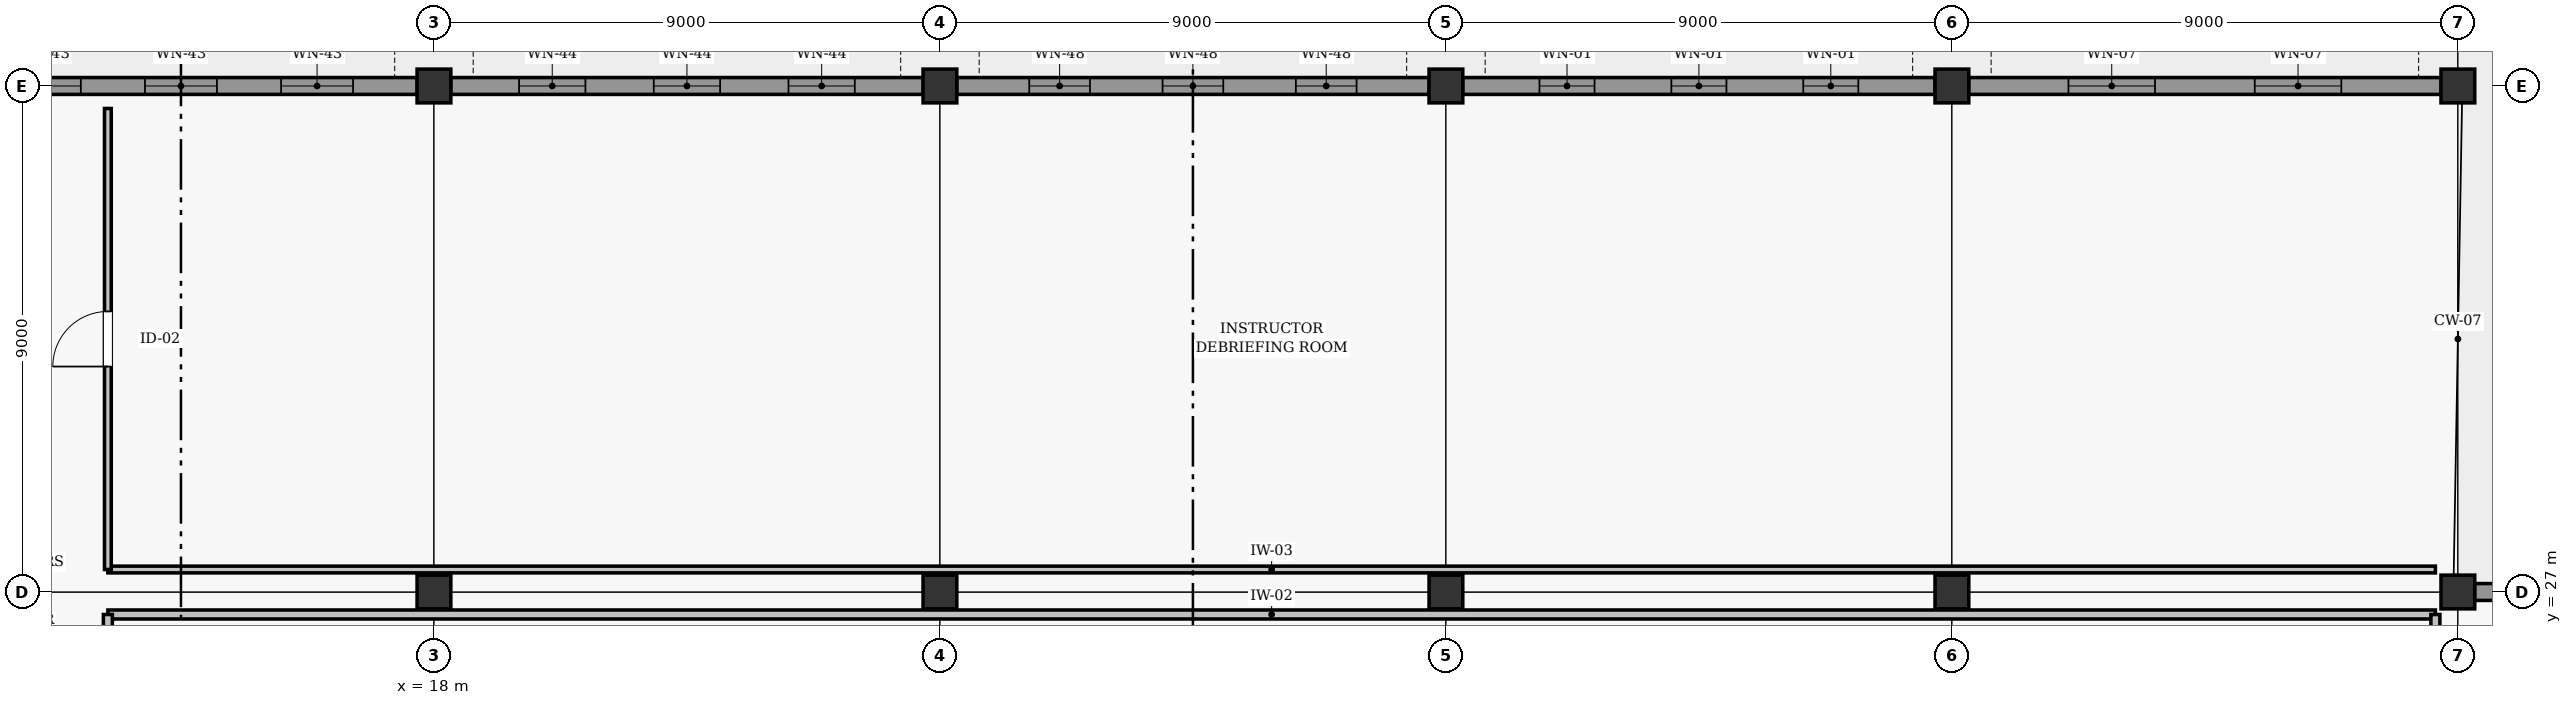
"""IFC4 building model, lengths in metres.
Left out: names, types, materials, properties, quantities, classifications, styles, units other than length and angle.
Written with IfcOpenShell. Run it as: python <this file> out.ifc"""

import sys

from ifc_helpers import new_model, si_unit, direction, frame, frame_2d, origin, origin_2d, place, context, subcontext, project, spatial, rectangle, extrude, element, fill, save


model = new_model("IFC4")
c1 = context("Model", 3, precision=1e-05, world=origin(), true_north=direction((0.0, 1.0)))
c2 = subcontext(c1, "Body", "Model", "MODEL_VIEW")
j1 = project(units=[si_unit("LENGTHUNIT", "METRE"), si_unit("PLANEANGLEUNIT", "RADIAN")], contexts=[c1])
p1 = place(None, origin())
s1 = spatial("IfcSite", under=j1, at=p1, CompositionType="ELEMENT")
p2 = place(p1, origin())
s2 = spatial("IfcBuilding", under=s1, at=p2, CompositionType="ELEMENT")
p3 = place(p2, frame((0.0, 0.0, 8.4)))
s3 = spatial("IfcBuildingStorey", under=s2, at=p3, CompositionType="ELEMENT", Elevation=8.4)
for number, where, z_axis, x_axis in (
    (1, (18.0, 27.0, 0.0), (0.0, 0.0, 1.0), (1.0, 0.0, 0.0)),
    (2, (18.0, 36.0, 0.0), (0.0, 0.0, 1.0), (1.0, 0.0, 0.0)),
    (3, (27.0, 27.0, 0.0), (0.0, 0.0, 1.0), (1.0, 0.0, 0.0)),
    (4, (27.0, 36.0, 0.0), (0.0, 0.0, 1.0), (1.0, 0.0, 0.0)),
    (5, (36.0, 27.0, 0.0), (0.0, 0.0, 1.0), (1.0, 0.0, 0.0)),
    (6, (36.0, 36.0, 0.0), (0.0, 0.0, 1.0), (1.0, 0.0, 0.0)),
    (7, (45.0, 27.0, 0.0), (0.0, 0.0, 1.0), (1.0, 0.0, 0.0)),
    (8, (45.0, 36.0, 0.0), (0.0, 0.0, 1.0), (1.0, 0.0, 0.0)),
    (9, (54.0, 27.0, 0.0), (0.0, 0.0, 1.0), (1.0, 0.0, 0.0)),
    (10, (54.0, 36.0, 0.0), (0.0, 0.0, 1.0), (1.0, 0.0, 0.0)),
):
    element("IfcColumn", number, at=place(p3, frame(where, z_axis=z_axis, x_axis=x_axis)), inside=s3, PredefinedType="COLUMN", context=c2, shape_type="SweptSolid", body=[
        extrude(rectangle(XDim=0.6, YDim=0.6, at=origin_2d()), origin(), (0.0, 0.0, 1.0), 3.6),
    ])
p4 = place(p3, frame((54.298, 27.0, 0.0), z_axis=(0.0, 0.0, 1.0), x_axis=(1.0, 0.0, 0.0)))
e11 = element("IfcWall", 11, at=p4, inside=s3, PredefinedType="SOLIDWALL", context=c2, shape_type="SweptSolid", body=[
    extrude(rectangle(XDim=8.404, YDim=0.3, at=frame_2d((4.202, 0.0))), origin(), (0.0, 0.0, 1.0), 2.902),
])
p5 = place(p4, frame((1.735, 0.0, 0.85)))
e12 = element("IfcOpeningElement", 12, at=p5, cuts=e11, PredefinedType="OPENING", context=c2, shape_type="SweptSolid", body=[
    extrude(rectangle(XDim=1.6, YDim=1.86, at=frame_2d((0.8, 0.93))), frame((0.0, 0.16, 0.0), z_axis=(0.0, -1.0, 0.0), x_axis=(1.0, 0.0, 0.0)), (0.0, 0.0, 1.0), 0.32),
])
p6 = place(p4, frame((5.069, 0.0, 0.85)))
e13 = element("IfcOpeningElement", 13, at=p6, cuts=e11, PredefinedType="OPENING", context=c2, shape_type="SweptSolid", body=[
    extrude(rectangle(XDim=1.6, YDim=1.86, at=frame_2d((0.8, 0.93))), frame((0.0, 0.16, 0.0), z_axis=(0.0, -1.0, 0.0), x_axis=(1.0, 0.0, 0.0)), (0.0, 0.0, 1.0), 0.32),
])
p7 = place(p3, frame((9.298, 36.0, 0.0), z_axis=(0.0, 0.0, 1.0), x_axis=(1.0, 0.0, 0.0)))
e14 = element("IfcWall", 14, at=p7, inside=s3, PredefinedType="SOLIDWALL", context=c2, shape_type="SweptSolid", body=[
    extrude(rectangle(XDim=8.404, YDim=0.3, at=frame_2d((4.202, 0.0))), origin(), (0.0, 0.0, 1.0), 2.862),
])
p8 = place(p7, frame((1.141, 0.0, 0.85)))
e15 = element("IfcOpeningElement", 15, at=p8, cuts=e14, PredefinedType="OPENING", context=c2, shape_type="SweptSolid", body=[
    extrude(rectangle(XDim=1.28, YDim=1.34, at=frame_2d((0.64, 0.67))), frame((0.0, 0.16, 0.0), z_axis=(0.0, -1.0, 0.0), x_axis=(1.0, 0.0, 0.0)), (0.0, 0.0, 1.0), 0.32),
])
p9 = place(p7, frame((3.562, 0.0, 0.85)))
e16 = element("IfcOpeningElement", 16, at=p9, cuts=e14, PredefinedType="OPENING", context=c2, shape_type="SweptSolid", body=[
    extrude(rectangle(XDim=1.28, YDim=1.34, at=frame_2d((0.64, 0.67))), frame((0.0, 0.16, 0.0), z_axis=(0.0, -1.0, 0.0), x_axis=(1.0, 0.0, 0.0)), (0.0, 0.0, 1.0), 0.32),
])
p10 = place(p7, frame((5.983, 0.0, 0.85)))
e17 = element("IfcOpeningElement", 17, at=p10, cuts=e14, PredefinedType="OPENING", context=c2, shape_type="SweptSolid", body=[
    extrude(rectangle(XDim=1.28, YDim=1.34, at=frame_2d((0.64, 0.67))), frame((0.0, 0.16, 0.0), z_axis=(0.0, -1.0, 0.0), x_axis=(1.0, 0.0, 0.0)), (0.0, 0.0, 1.0), 0.32),
])
p11 = place(p3, frame((18.298, 36.0, 0.0), z_axis=(0.0, 0.0, 1.0), x_axis=(1.0, 0.0, 0.0)))
e18 = element("IfcWall", 18, at=p11, inside=s3, PredefinedType="SOLIDWALL", context=c2, shape_type="SweptSolid", body=[
    extrude(rectangle(XDim=8.404, YDim=0.3, at=frame_2d((4.202, 0.0))), origin(), (0.0, 0.0, 1.0), 2.862),
])
p12 = place(p11, frame((1.216, 0.0, 0.85)))
e19 = element("IfcOpeningElement", 19, at=p12, cuts=e18, PredefinedType="OPENING", context=c2, shape_type="SweptSolid", body=[
    extrude(rectangle(XDim=1.18, YDim=1.3, at=frame_2d((0.59, 0.65))), frame((0.0, 0.16, 0.0), z_axis=(0.0, -1.0, 0.0), x_axis=(1.0, 0.0, 0.0)), (0.0, 0.0, 1.0), 0.32),
])
p13 = place(p11, frame((3.612, 0.0, 0.85)))
e20 = element("IfcOpeningElement", 20, at=p13, cuts=e18, PredefinedType="OPENING", context=c2, shape_type="SweptSolid", body=[
    extrude(rectangle(XDim=1.18, YDim=1.3, at=frame_2d((0.59, 0.65))), frame((0.0, 0.16, 0.0), z_axis=(0.0, -1.0, 0.0), x_axis=(1.0, 0.0, 0.0)), (0.0, 0.0, 1.0), 0.32),
])
p14 = place(p11, frame((6.008, 0.0, 0.85)))
e21 = element("IfcOpeningElement", 21, at=p14, cuts=e18, PredefinedType="OPENING", context=c2, shape_type="SweptSolid", body=[
    extrude(rectangle(XDim=1.18, YDim=1.3, at=frame_2d((0.59, 0.65))), frame((0.0, 0.16, 0.0), z_axis=(0.0, -1.0, 0.0), x_axis=(1.0, 0.0, 0.0)), (0.0, 0.0, 1.0), 0.32),
])
p15 = place(p3, frame((27.298, 36.0, 0.0), z_axis=(0.0, 0.0, 1.0), x_axis=(1.0, 0.0, 0.0)))
e22 = element("IfcWall", 22, at=p15, inside=s3, PredefinedType="SOLIDWALL", context=c2, shape_type="SweptSolid", body=[
    extrude(rectangle(XDim=8.404, YDim=0.3, at=frame_2d((4.202, 0.0))), origin(), (0.0, 0.0, 1.0), 2.902),
])
p16 = place(p15, frame((1.291, 0.0, 0.85)))
e23 = element("IfcOpeningElement", 23, at=p16, cuts=e22, PredefinedType="OPENING", context=c2, shape_type="SweptSolid", body=[
    extrude(rectangle(XDim=1.08, YDim=1.26, at=frame_2d((0.54, 0.63))), frame((0.0, 0.16, 0.0), z_axis=(0.0, -1.0, 0.0), x_axis=(1.0, 0.0, 0.0)), (0.0, 0.0, 1.0), 0.32),
])
p17 = place(p15, frame((3.662, 0.0, 0.85)))
e24 = element("IfcOpeningElement", 24, at=p17, cuts=e22, PredefinedType="OPENING", context=c2, shape_type="SweptSolid", body=[
    extrude(rectangle(XDim=1.08, YDim=1.26, at=frame_2d((0.54, 0.63))), frame((0.0, 0.16, 0.0), z_axis=(0.0, -1.0, 0.0), x_axis=(1.0, 0.0, 0.0)), (0.0, 0.0, 1.0), 0.32),
])
p18 = place(p15, frame((6.033, 0.0, 0.85)))
e25 = element("IfcOpeningElement", 25, at=p18, cuts=e22, PredefinedType="OPENING", context=c2, shape_type="SweptSolid", body=[
    extrude(rectangle(XDim=1.08, YDim=1.26, at=frame_2d((0.54, 0.63))), frame((0.0, 0.16, 0.0), z_axis=(0.0, -1.0, 0.0), x_axis=(1.0, 0.0, 0.0)), (0.0, 0.0, 1.0), 0.32),
])
p19 = place(p3, frame((36.298, 36.0, 0.0), z_axis=(0.0, 0.0, 1.0), x_axis=(1.0, 0.0, 0.0)))
e26 = element("IfcWall", 26, at=p19, inside=s3, PredefinedType="SOLIDWALL", context=c2, shape_type="SweptSolid", body=[
    extrude(rectangle(XDim=8.404, YDim=0.3, at=frame_2d((4.202, 0.0))), origin(), (0.0, 0.0, 1.0), 2.902),
])
p20 = place(p19, frame((1.366, 0.0, 0.85)))
e27 = element("IfcOpeningElement", 27, at=p20, cuts=e26, PredefinedType="OPENING", context=c2, shape_type="SweptSolid", body=[
    extrude(rectangle(XDim=0.98, YDim=1.22, at=frame_2d((0.49, 0.61))), frame((0.0, 0.16, 0.0), z_axis=(0.0, -1.0, 0.0), x_axis=(1.0, 0.0, 0.0)), (0.0, 0.0, 1.0), 0.32),
])
p21 = place(p19, frame((3.712, 0.0, 0.85)))
e28 = element("IfcOpeningElement", 28, at=p21, cuts=e26, PredefinedType="OPENING", context=c2, shape_type="SweptSolid", body=[
    extrude(rectangle(XDim=0.98, YDim=1.22, at=frame_2d((0.49, 0.61))), frame((0.0, 0.16, 0.0), z_axis=(0.0, -1.0, 0.0), x_axis=(1.0, 0.0, 0.0)), (0.0, 0.0, 1.0), 0.32),
])
p22 = place(p19, frame((6.058, 0.0, 0.85)))
e29 = element("IfcOpeningElement", 29, at=p22, cuts=e26, PredefinedType="OPENING", context=c2, shape_type="SweptSolid", body=[
    extrude(rectangle(XDim=0.98, YDim=1.22, at=frame_2d((0.49, 0.61))), frame((0.0, 0.16, 0.0), z_axis=(0.0, -1.0, 0.0), x_axis=(1.0, 0.0, 0.0)), (0.0, 0.0, 1.0), 0.32),
])
p23 = place(p3, frame((45.298, 36.0, 0.0), z_axis=(0.0, 0.0, 1.0), x_axis=(1.0, 0.0, 0.0)))
e30 = element("IfcWall", 30, at=p23, inside=s3, PredefinedType="SOLIDWALL", context=c2, shape_type="SweptSolid", body=[
    extrude(rectangle(XDim=8.404, YDim=0.3, at=frame_2d((4.202, 0.0))), origin(), (0.0, 0.0, 1.0), 2.902),
])
p24 = place(p23, frame((1.775, 0.0, 0.8)))
e31 = element("IfcOpeningElement", 31, at=p24, cuts=e30, PredefinedType="OPENING", context=c2, shape_type="SweptSolid", body=[
    extrude(rectangle(XDim=1.54, YDim=1.18, at=frame_2d((0.77, 0.59))), frame((0.0, 0.16, 0.0), z_axis=(0.0, -1.0, 0.0), x_axis=(1.0, 0.0, 0.0)), (0.0, 0.0, 1.0), 0.32),
])
p25 = place(p23, frame((5.089, 0.0, 0.8)))
e32 = element("IfcOpeningElement", 32, at=p25, cuts=e30, PredefinedType="OPENING", context=c2, shape_type="SweptSolid", body=[
    extrude(rectangle(XDim=1.54, YDim=1.18, at=frame_2d((0.77, 0.59))), frame((0.0, 0.16, 0.0), z_axis=(0.0, -1.0, 0.0), x_axis=(1.0, 0.0, 0.0)), (0.0, 0.0, 1.0), 0.32),
])
p26 = place(p3, frame((12.2, 26.6, 0.0), z_axis=(0.0, 0.0, 1.0), x_axis=(1.0, 0.0, 0.0)))
e33 = element("IfcWall", 33, at=p26, inside=s3, PredefinedType="PARTITIONING", context=c2, shape_type="SweptSolid", body=[
    extrude(rectangle(XDim=41.4, YDim=0.16, at=frame_2d((20.7, 0.0))), origin(), (0.0, 0.0, 1.0), 2.895),
])
p27 = place(p3, frame((12.2, 18.4, 0.0), z_axis=(0.0, 0.0, 1.0), x_axis=(0.0, 1.0, 0.0)))
e34 = element("IfcWall", 34, at=p27, inside=s3, PredefinedType="PARTITIONING", context=c2, shape_type="SweptSolid", body=[
    extrude(rectangle(XDim=8.2, YDim=0.16, at=frame_2d((4.1, 0.0))), origin(), (0.0, 0.0, 1.0), 3.35),
])
p28 = place(p27, frame((3.59, 0.0, 0.0)))
e35 = element("IfcOpeningElement", 35, at=p28, cuts=e34, PredefinedType="OPENING", context=c2, shape_type="SweptSolid", body=[
    extrude(rectangle(XDim=1.02, YDim=2.1, at=frame_2d((0.51, 1.05))), frame((0.0, 0.09, 0.0), z_axis=(0.0, -1.0, 0.0), x_axis=(1.0, 0.0, 0.0)), (0.0, 0.0, 1.0), 0.18),
])
p29 = place(p3, frame((53.6, 18.4, 0.0), z_axis=(0.0, 0.0, 1.0), x_axis=(0.0, 1.0, 0.0)))
e36 = element("IfcWall", 36, at=p29, inside=s3, PredefinedType="PARTITIONING", context=c2, shape_type="SweptSolid", body=[
    extrude(rectangle(XDim=8.2, YDim=0.16, at=frame_2d((4.1, 0.0))), origin(), (0.0, 0.0, 1.0), 3.35),
])
p30 = place(p3, frame((12.2, 27.4, 0.0), z_axis=(0.0, 0.0, 1.0), x_axis=(1.0, 0.0, 0.0)))
e37 = element("IfcWall", 37, at=p30, inside=s3, PredefinedType="PARTITIONING", context=c2, shape_type="SweptSolid", body=[
    extrude(rectangle(XDim=41.4, YDim=0.12, at=frame_2d((20.7, 0.0))), origin(), (0.0, 0.0, 1.0), 2.845),
])
p31 = place(p3, frame((12.2, 27.4, 0.0), z_axis=(0.0, 0.0, 1.0), x_axis=(0.0, 1.0, 0.0)))
e38 = element("IfcWall", 38, at=p31, inside=s3, PredefinedType="PARTITIONING", context=c2, shape_type="SweptSolid", body=[
    extrude(rectangle(XDim=8.2, YDim=0.12, at=frame_2d((4.1, 0.0))), origin(), (0.0, 0.0, 1.0), 3.35),
])
p32 = place(p31, frame((3.61, 0.0, 0.0)))
e39 = element("IfcOpeningElement", 39, at=p32, cuts=e38, PredefinedType="OPENING", context=c2, shape_type="SweptSolid", body=[
    extrude(rectangle(XDim=0.98, YDim=2.08, at=frame_2d((0.49, 1.04))), frame((0.0, 0.07, 0.0), z_axis=(0.0, -1.0, 0.0), x_axis=(1.0, 0.0, 0.0)), (0.0, 0.0, 1.0), 0.14),
])
p33 = place(p8, origin())
e40 = element("IfcWindow", 40, at=p33, inside=s3, PartitioningType="SINGLE_PANEL", PredefinedType="WINDOW", context=c2, shape_type="SweptSolid", body=[
    extrude(rectangle(XDim=1.28, YDim=1.34, at=frame_2d((0.64, 0.67))), frame((0.0, 0.03, 0.0), z_axis=(0.0, -1.0, 0.0), x_axis=(1.0, 0.0, 0.0)), (0.0, 0.0, 1.0), 0.06),
])
fill(e15, e40)
p34 = place(p9, origin())
e41 = element("IfcWindow", 41, at=p34, inside=s3, PartitioningType="SINGLE_PANEL", PredefinedType="WINDOW", context=c2, shape_type="SweptSolid", body=[
    extrude(rectangle(XDim=1.28, YDim=1.34, at=frame_2d((0.64, 0.67))), frame((0.0, 0.03, 0.0), z_axis=(0.0, -1.0, 0.0), x_axis=(1.0, 0.0, 0.0)), (0.0, 0.0, 1.0), 0.06),
])
fill(e16, e41)
p35 = place(p10, origin())
e42 = element("IfcWindow", 42, at=p35, inside=s3, PartitioningType="SINGLE_PANEL", PredefinedType="WINDOW", context=c2, shape_type="SweptSolid", body=[
    extrude(rectangle(XDim=1.28, YDim=1.34, at=frame_2d((0.64, 0.67))), frame((0.0, 0.03, 0.0), z_axis=(0.0, -1.0, 0.0), x_axis=(1.0, 0.0, 0.0)), (0.0, 0.0, 1.0), 0.06),
])
fill(e17, e42)
p36 = place(p12, origin())
e43 = element("IfcWindow", 43, at=p36, inside=s3, PartitioningType="SINGLE_PANEL", PredefinedType="WINDOW", context=c2, shape_type="SweptSolid", body=[
    extrude(rectangle(XDim=1.18, YDim=1.3, at=frame_2d((0.59, 0.65))), frame((0.0, 0.03, 0.0), z_axis=(0.0, -1.0, 0.0), x_axis=(1.0, 0.0, 0.0)), (0.0, 0.0, 1.0), 0.06),
])
fill(e19, e43)
p37 = place(p13, origin())
e44 = element("IfcWindow", 44, at=p37, inside=s3, PartitioningType="SINGLE_PANEL", PredefinedType="WINDOW", context=c2, shape_type="SweptSolid", body=[
    extrude(rectangle(XDim=1.18, YDim=1.3, at=frame_2d((0.59, 0.65))), frame((0.0, 0.03, 0.0), z_axis=(0.0, -1.0, 0.0), x_axis=(1.0, 0.0, 0.0)), (0.0, 0.0, 1.0), 0.06),
])
fill(e20, e44)
p38 = place(p14, origin())
e45 = element("IfcWindow", 45, at=p38, inside=s3, PartitioningType="SINGLE_PANEL", PredefinedType="WINDOW", context=c2, shape_type="SweptSolid", body=[
    extrude(rectangle(XDim=1.18, YDim=1.3, at=frame_2d((0.59, 0.65))), frame((0.0, 0.03, 0.0), z_axis=(0.0, -1.0, 0.0), x_axis=(1.0, 0.0, 0.0)), (0.0, 0.0, 1.0), 0.06),
])
fill(e21, e45)
p39 = place(p16, origin())
e46 = element("IfcWindow", 46, at=p39, inside=s3, PartitioningType="SINGLE_PANEL", PredefinedType="WINDOW", context=c2, shape_type="SweptSolid", body=[
    extrude(rectangle(XDim=1.08, YDim=1.26, at=frame_2d((0.54, 0.63))), frame((0.0, 0.03, 0.0), z_axis=(0.0, -1.0, 0.0), x_axis=(1.0, 0.0, 0.0)), (0.0, 0.0, 1.0), 0.06),
])
fill(e23, e46)
p40 = place(p17, origin())
e47 = element("IfcWindow", 47, at=p40, inside=s3, PartitioningType="SINGLE_PANEL", PredefinedType="WINDOW", context=c2, shape_type="SweptSolid", body=[
    extrude(rectangle(XDim=1.08, YDim=1.26, at=frame_2d((0.54, 0.63))), frame((0.0, 0.03, 0.0), z_axis=(0.0, -1.0, 0.0), x_axis=(1.0, 0.0, 0.0)), (0.0, 0.0, 1.0), 0.06),
])
fill(e24, e47)
p41 = place(p18, origin())
e48 = element("IfcWindow", 48, at=p41, inside=s3, PartitioningType="SINGLE_PANEL", PredefinedType="WINDOW", context=c2, shape_type="SweptSolid", body=[
    extrude(rectangle(XDim=1.08, YDim=1.26, at=frame_2d((0.54, 0.63))), frame((0.0, 0.03, 0.0), z_axis=(0.0, -1.0, 0.0), x_axis=(1.0, 0.0, 0.0)), (0.0, 0.0, 1.0), 0.06),
])
fill(e25, e48)
p42 = place(p20, origin())
e49 = element("IfcWindow", 49, at=p42, inside=s3, PartitioningType="SINGLE_PANEL", PredefinedType="WINDOW", context=c2, shape_type="SweptSolid", body=[
    extrude(rectangle(XDim=0.98, YDim=1.22, at=frame_2d((0.49, 0.61))), frame((0.0, 0.03, 0.0), z_axis=(0.0, -1.0, 0.0), x_axis=(1.0, 0.0, 0.0)), (0.0, 0.0, 1.0), 0.06),
])
fill(e27, e49)
p43 = place(p21, origin())
e50 = element("IfcWindow", 50, at=p43, inside=s3, PartitioningType="SINGLE_PANEL", PredefinedType="WINDOW", context=c2, shape_type="SweptSolid", body=[
    extrude(rectangle(XDim=0.98, YDim=1.22, at=frame_2d((0.49, 0.61))), frame((0.0, 0.03, 0.0), z_axis=(0.0, -1.0, 0.0), x_axis=(1.0, 0.0, 0.0)), (0.0, 0.0, 1.0), 0.06),
])
fill(e28, e50)
p44 = place(p22, origin())
e51 = element("IfcWindow", 51, at=p44, inside=s3, PartitioningType="SINGLE_PANEL", PredefinedType="WINDOW", context=c2, shape_type="SweptSolid", body=[
    extrude(rectangle(XDim=0.98, YDim=1.22, at=frame_2d((0.49, 0.61))), frame((0.0, 0.03, 0.0), z_axis=(0.0, -1.0, 0.0), x_axis=(1.0, 0.0, 0.0)), (0.0, 0.0, 1.0), 0.06),
])
fill(e29, e51)
p45 = place(p24, origin())
e52 = element("IfcWindow", 52, at=p45, inside=s3, PartitioningType="SINGLE_PANEL", PredefinedType="WINDOW", context=c2, shape_type="SweptSolid", body=[
    extrude(rectangle(XDim=1.54, YDim=1.18, at=frame_2d((0.77, 0.59))), frame((0.0, 0.03, 0.0), z_axis=(0.0, -1.0, 0.0), x_axis=(1.0, 0.0, 0.0)), (0.0, 0.0, 1.0), 0.06),
])
fill(e31, e52)
p46 = place(p25, origin())
e53 = element("IfcWindow", 53, at=p46, inside=s3, PartitioningType="SINGLE_PANEL", PredefinedType="WINDOW", context=c2, shape_type="SweptSolid", body=[
    extrude(rectangle(XDim=1.54, YDim=1.18, at=frame_2d((0.77, 0.59))), frame((0.0, 0.03, 0.0), z_axis=(0.0, -1.0, 0.0), x_axis=(1.0, 0.0, 0.0)), (0.0, 0.0, 1.0), 0.06),
])
fill(e32, e53)
p47 = place(p32, origin())
e54 = element("IfcDoor", 54, at=p47, inside=s3, OperationType="SINGLE_SWING_LEFT", PredefinedType="DOOR", context=c2, shape_type="SweptSolid", body=[
    extrude(rectangle(XDim=0.98, YDim=2.08, at=frame_2d((0.49, 1.04))), frame((0.0, 0.025, 0.0), z_axis=(0.0, -1.0, 0.0), x_axis=(1.0, 0.0, 0.0)), (0.0, 0.0, 1.0), 0.05),
])
fill(e39, e54)
save(model, sys.argv[1])
